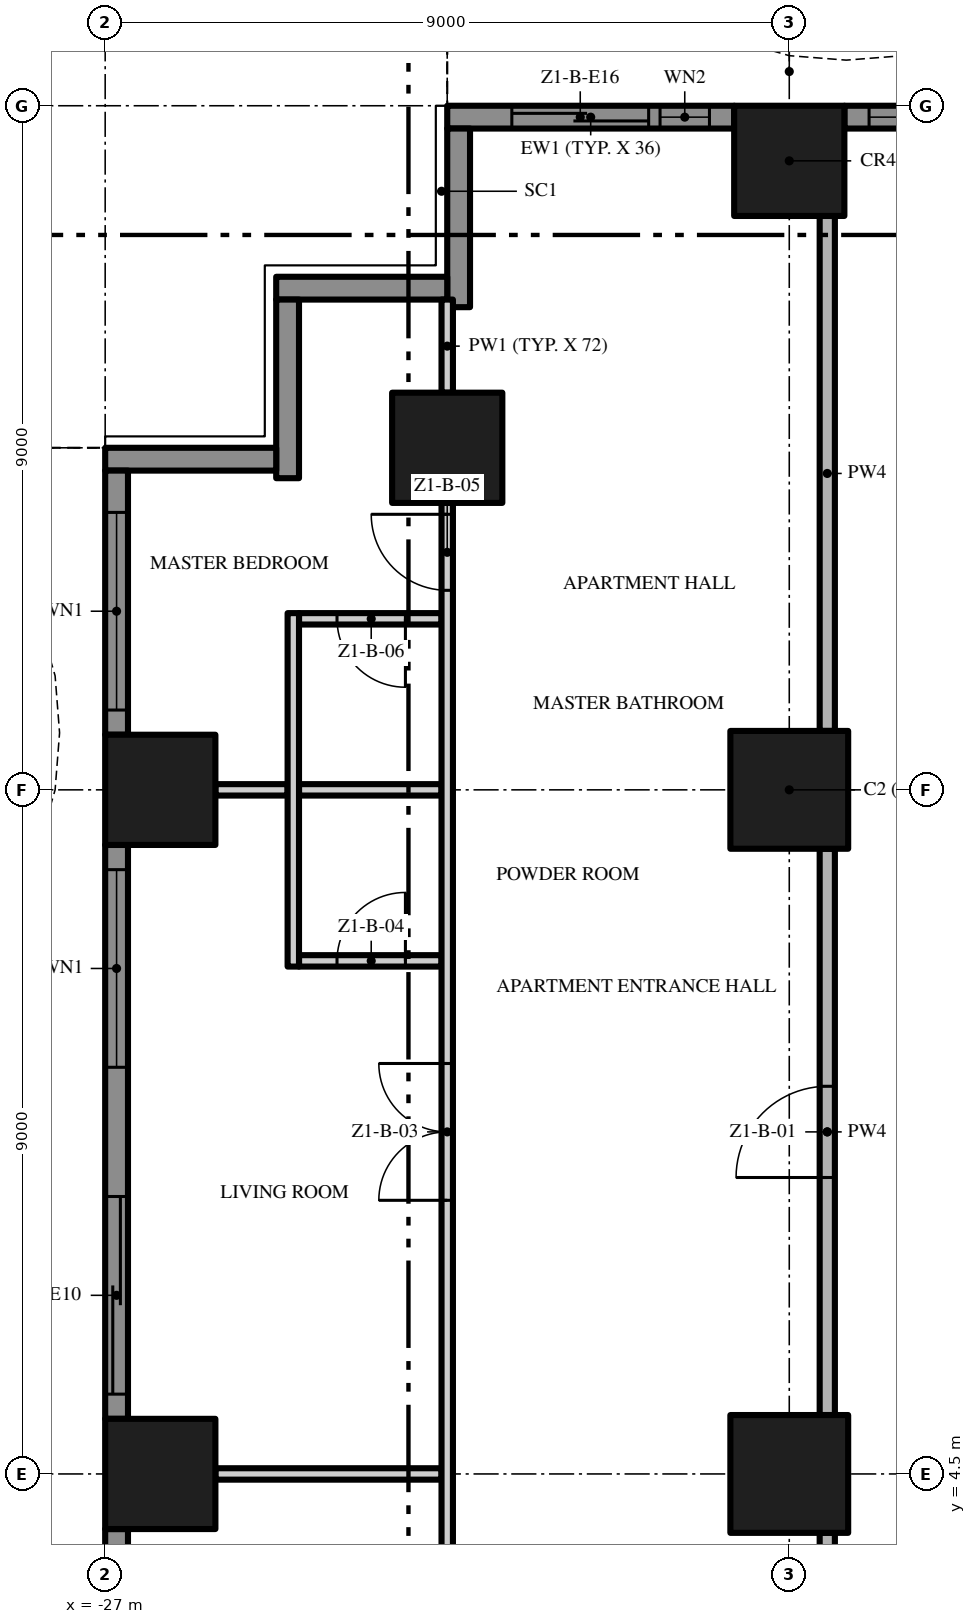
"""IFC4 building model, lengths in metres.
Left out: names, types, materials, properties, quantities, classifications, styles, units other than length and angle.
Written with IfcOpenShell. Run it as: python <this file> out.ifc"""

import sys

from ifc_helpers import new_model, si_unit, direction, frame, frame_2d, origin, origin_2d, place, context, subcontext, project, spatial, polyline, rectangle, outline, extrude, element, fill, save


model = new_model("IFC4")
c1 = context("Model", 3, precision=1e-05, world=origin(), true_north=direction((0.0, 1.0)))
c2 = subcontext(c1, "Body", "Model", "MODEL_VIEW")
j1 = project(units=[si_unit("LENGTHUNIT", "METRE"), si_unit("PLANEANGLEUNIT", "RADIAN")], contexts=[c1])
p1 = place(None, origin())
s1 = spatial("IfcSite", under=j1, at=p1, CompositionType="ELEMENT")
p2 = place(p1, origin())
s2 = spatial("IfcBuilding", under=s1, at=p2, CompositionType="ELEMENT")
p3 = place(p2, frame((0.0, 0.0, 30.2)))
s3 = spatial("IfcBuildingStorey", under=s2, at=p3, CompositionType="ELEMENT", Elevation=30.2)
p4 = place(p3, frame((-18.0, 13.5, 0.0), z_axis=(0.0, 0.0, 1.0), x_axis=(1.0, 0.0, 0.0)))
e1 = element("IfcColumn", 1, at=p4, inside=s3, PredefinedType="COLUMN", context=c2, shape_type="SweptSolid", body=[
    extrude(rectangle(XDim=1.55, YDim=1.55, at=origin_2d()), origin(), (0.0, 0.0, 1.0), 3.5),
])
p5 = place(p3, frame((-18.0, 21.775, 0.0), z_axis=(0.0, 0.0, 1.0), x_axis=(1.0, 0.0, 0.0)))
e2 = element("IfcColumn", 2, at=p5, inside=s3, PredefinedType="COLUMN", context=c2, shape_type="SweptSolid", body=[
    extrude(rectangle(XDim=1.45, YDim=1.45, at=origin_2d()), origin(), (0.0, 0.0, 1.0), 3.5),
])
p6 = place(p3, frame((-18.0, 4.5, 0.0), z_axis=(0.0, 0.0, 1.0), x_axis=(1.0, 0.0, 0.0)))
e3 = element("IfcColumn", 3, at=p6, inside=s3, PredefinedType="COLUMN", context=c2, shape_type="SweptSolid", body=[
    extrude(rectangle(XDim=1.55, YDim=1.55, at=origin_2d()), origin(), (0.0, 0.0, 1.0), 3.5),
])
for number, where, z_axis, x_axis in (
    (4, (-26.275, 13.5, 0.0), (0.0, 0.0, 1.0), (1.0, 0.0, 0.0)),
    (5, (-22.5, 18.0, 0.0), (0.0, 0.0, 1.0), (1.0, 0.0, 0.0)),
    (6, (-26.275, 4.5, 0.0), (0.0, 0.0, 1.0), (1.0, 0.0, 0.0)),
):
    element("IfcColumn", number, at=place(p3, frame(where, z_axis=z_axis, x_axis=x_axis)), inside=s3, PredefinedType="COLUMN", context=c2, shape_type="SweptSolid", body=[
        extrude(rectangle(XDim=1.45, YDim=1.45, at=origin_2d()), origin(), (0.0, 0.0, 1.0), 3.5),
    ])
p7 = place(p3, frame((-17.275, 22.35, 0.0), z_axis=(0.0, 0.0, 1.0), x_axis=(1.0, 0.0, 0.0)))
e7 = element("IfcWall", 7, at=p7, inside=s3, PredefinedType="SOLIDWALL", context=c2, shape_type="SweptSolid", body=[
    extrude(rectangle(XDim=3.775, YDim=0.3, at=frame_2d((1.887, 0.0))), origin(), (0.0, 0.0, 1.0), 3.5),
])
p8 = place(p7, frame((0.325, 0.0, 0.45)))
e8 = element("IfcOpeningElement", 8, at=p8, cuts=e7, PredefinedType="OPENING", context=c2, shape_type="SweptSolid", body=[
    extrude(rectangle(XDim=2.6, YDim=2.65, at=frame_2d((1.3, 1.325))), frame((0.0, 0.16, 0.0), z_axis=(0.0, -1.0, 0.0), x_axis=(1.0, 0.0, 0.0)), (0.0, 0.0, 1.0), 0.32),
])
p9 = place(p3, frame((-22.5, 22.35, 0.0), z_axis=(0.0, 0.0, 1.0), x_axis=(1.0, 0.0, 0.0)))
e9 = element("IfcWall", 9, at=p9, inside=s3, PredefinedType="SOLIDWALL", context=c2, shape_type="SweptSolid", body=[
    extrude(rectangle(XDim=3.775, YDim=0.3, at=frame_2d((1.887, 0.0))), origin(), (0.0, 0.0, 1.0), 3.5),
])
p10 = place(p9, frame((2.8, 0.0, 0.45)))
e10 = element("IfcOpeningElement", 10, at=p10, cuts=e9, PredefinedType="OPENING", context=c2, shape_type="SweptSolid", body=[
    extrude(rectangle(XDim=0.65, YDim=2.65, at=frame_2d((0.325, 1.325))), frame((0.0, 0.16, 0.0), z_axis=(0.0, -1.0, 0.0), x_axis=(1.0, 0.0, 0.0)), (0.0, 0.0, 1.0), 0.32),
])
p11 = place(p9, frame((0.85, 0.0, 0.0)))
e11 = element("IfcOpeningElement", 11, at=p11, cuts=e9, PredefinedType="OPENING", context=c2, shape_type="SweptSolid", body=[
    extrude(rectangle(XDim=1.8, YDim=2.4, at=frame_2d((0.9, 1.2))), frame((0.0, 0.16, 0.0), z_axis=(0.0, -1.0, 0.0), x_axis=(1.0, 0.0, 0.0)), (0.0, 0.0, 1.0), 0.32),
])
p12 = place(p3, frame((-22.35, 19.85, 0.0), z_axis=(0.0, 0.0, 1.0), x_axis=(0.0, 1.0, 0.0)))
e12 = element("IfcWall", 12, at=p12, inside=s3, PredefinedType="SOLIDWALL", context=c2, shape_type="SweptSolid", body=[
    extrude(rectangle(XDim=2.35, YDim=0.3, at=frame_2d((1.175, 0.0))), origin(), (0.0, 0.0, 1.0), 3.5),
])
p13 = place(p3, frame((-24.75, 20.1, 0.0), z_axis=(0.0, 0.0, 1.0), x_axis=(1.0, 0.0, 0.0)))
e13 = element("IfcWall", 13, at=p13, inside=s3, PredefinedType="SOLIDWALL", context=c2, shape_type="SweptSolid", body=[
    extrude(rectangle(XDim=2.25, YDim=0.3, at=frame_2d((1.125, 0.0))), origin(), (0.0, 0.0, 1.0), 3.5),
])
p14 = place(p3, frame((-24.6, 17.6, 0.0), z_axis=(0.0, 0.0, 1.0), x_axis=(0.0, 1.0, 0.0)))
e14 = element("IfcWall", 14, at=p14, inside=s3, PredefinedType="SOLIDWALL", context=c2, shape_type="SweptSolid", body=[
    extrude(rectangle(XDim=2.35, YDim=0.3, at=frame_2d((1.175, 0.0))), origin(), (0.0, 0.0, 1.0), 3.5),
])
p15 = place(p3, frame((-27.0, 17.85, 0.0), z_axis=(0.0, 0.0, 1.0), x_axis=(1.0, 0.0, 0.0)))
e15 = element("IfcWall", 15, at=p15, inside=s3, PredefinedType="SOLIDWALL", context=c2, shape_type="SweptSolid", body=[
    extrude(rectangle(XDim=2.25, YDim=0.3, at=frame_2d((1.125, 0.0))), origin(), (0.0, 0.0, 1.0), 3.5),
])
p16 = place(p3, frame((-26.85, 14.225, 0.0), z_axis=(0.0, 0.0, 1.0), x_axis=(0.0, 1.0, 0.0)))
e16 = element("IfcWall", 16, at=p16, inside=s3, PredefinedType="SOLIDWALL", context=c2, shape_type="SweptSolid", body=[
    extrude(rectangle(XDim=3.475, YDim=0.3, at=frame_2d((1.738, 0.0))), origin(), (0.0, 0.0, 1.0), 3.5),
])
p17 = place(p16, frame((0.325, 0.0, 0.45)))
e17 = element("IfcOpeningElement", 17, at=p17, cuts=e16, PredefinedType="OPENING", context=c2, shape_type="SweptSolid", body=[
    extrude(rectangle(XDim=2.6, YDim=2.65, at=frame_2d((1.3, 1.325))), frame((0.0, 0.16, 0.0), z_axis=(0.0, -1.0, 0.0), x_axis=(1.0, 0.0, 0.0)), (0.0, 0.0, 1.0), 0.32),
])
p18 = place(p3, frame((-26.85, 5.225, 0.0), z_axis=(0.0, 0.0, 1.0), x_axis=(0.0, 1.0, 0.0)))
e18 = element("IfcWall", 18, at=p18, inside=s3, PredefinedType="SOLIDWALL", context=c2, shape_type="SweptSolid", body=[
    extrude(rectangle(XDim=7.55, YDim=0.3, at=frame_2d((3.775, 0.0))), origin(), (0.0, 0.0, 1.0), 3.5),
])
p19 = place(p18, frame((4.625, 0.0, 0.45)))
e19 = element("IfcOpeningElement", 19, at=p19, cuts=e18, PredefinedType="OPENING", context=c2, shape_type="SweptSolid", body=[
    extrude(rectangle(XDim=2.6, YDim=2.65, at=frame_2d((1.3, 1.325))), frame((0.0, 0.16, 0.0), z_axis=(0.0, -1.0, 0.0), x_axis=(1.0, 0.0, 0.0)), (0.0, 0.0, 1.0), 0.32),
])
p20 = place(p18, frame((0.325, 0.0, 0.0)))
e20 = element("IfcOpeningElement", 20, at=p20, cuts=e18, PredefinedType="OPENING", context=c2, shape_type="SweptSolid", body=[
    extrude(rectangle(XDim=2.6, YDim=2.4, at=frame_2d((1.3, 1.2))), frame((0.0, 0.16, 0.0), z_axis=(0.0, -1.0, 0.0), x_axis=(1.0, 0.0, 0.0)), (0.0, 0.0, 1.0), 0.32),
])
p21 = place(p3, frame((-26.85, -3.775, 0.0), z_axis=(0.0, 0.0, 1.0), x_axis=(0.0, 1.0, 0.0)))
e21 = element("IfcWall", 21, at=p21, inside=s3, PredefinedType="SOLIDWALL", context=c2, shape_type="SweptSolid", body=[
    extrude(rectangle(XDim=7.55, YDim=0.3, at=frame_2d((3.775, 0.0))), origin(), (0.0, 0.0, 1.0), 3.5),
])
p22 = place(p21, frame((4.625, 0.0, 0.45)))
e22 = element("IfcOpeningElement", 22, at=p22, cuts=e21, PredefinedType="OPENING", context=c2, shape_type="SweptSolid", body=[
    extrude(rectangle(XDim=2.6, YDim=2.65, at=frame_2d((1.3, 1.325))), frame((0.0, 0.16, 0.0), z_axis=(0.0, -1.0, 0.0), x_axis=(1.0, 0.0, 0.0)), (0.0, 0.0, 1.0), 0.32),
])
p23 = place(p21, frame((0.325, 0.0, 0.45)))
e23 = element("IfcOpeningElement", 23, at=p23, cuts=e21, PredefinedType="OPENING", context=c2, shape_type="SweptSolid", body=[
    extrude(rectangle(XDim=2.6, YDim=2.65, at=frame_2d((1.3, 1.325))), frame((0.0, 0.16, 0.0), z_axis=(0.0, -1.0, 0.0), x_axis=(1.0, 0.0, 0.0)), (0.0, 0.0, 1.0), 0.32),
])
p24 = place(p3, origin())
e24 = element("IfcWall", 24, at=p24, inside=s3, PredefinedType="USERDEFINED", context=c2, shape_type="SweptSolid", body=[
    extrude(outline(polyline([(-13.5, 24.3), (-15.0, 23.595), (-16.5, 23.159), (-17.25, 23.1), (-18.0, 23.159), (-19.5, 23.595), (-21.0, 24.3), (-22.5, 25.005), (-22.606, 24.779), (-21.106, 24.074), (-19.589, 23.36), (-18.045, 22.911), (-17.25, 22.849), (-16.455, 22.911), (-14.911, 23.36), (-13.394, 24.074), (-13.5, 24.3)])), origin(), (0.0, 0.0, 1.0), 0.9),
])
p25 = place(p3, origin())
e25 = element("IfcWall", 25, at=p25, inside=s3, PredefinedType="USERDEFINED", context=c2, shape_type="SweptSolid", body=[
    extrude(outline(polyline([(-28.8, 18.0), (-28.095, 16.5), (-27.659, 15.0), (-27.6, 14.25), (-27.659, 13.5), (-28.095, 12.0), (-28.8, 10.5), (-29.505, 9.0), (-29.941, 7.5), (-30.0, 6.75), (-29.941, 6.0), (-29.505, 4.5), (-28.8, 3.0), (-28.095, 1.5), (-27.659, 0.0), (-27.6, -0.75), (-27.659, -1.5), (-28.095, -3.0), (-28.8, -4.5), (-29.505, -6.0), (-29.941, -7.5), (-30.0, -8.25), (-29.941, -9.0), (-29.505, -10.5), (-28.8, -12.0), (-28.095, -13.5), (-27.659, -15.0), (-27.6, -15.75), (-27.659, -16.5), (-28.095, -18.0), (-27.855, -18.07), (-27.411, -16.545), (-27.349, -15.75), (-27.411, -14.955), (-27.86, -13.411), (-28.574, -11.894), (-29.271, -10.411), (-29.694, -8.955), (-29.749, -8.25), (-29.694, -7.545), (-29.271, -6.089), (-28.574, -4.606), (-27.86, -3.089), (-27.411, -1.545), (-27.349, -0.75), (-27.411, 0.045), (-27.86, 1.589), (-28.574, 3.106), (-29.271, 4.589), (-29.694, 6.045), (-29.749, 6.75), (-29.694, 7.455), (-29.271, 8.911), (-28.574, 10.394), (-27.86, 11.911), (-27.411, 13.455), (-27.349, 14.25), (-27.411, 15.045), (-27.86, 16.589), (-28.574, 18.106), (-28.8, 18.0)])), origin(), (0.0, 0.0, 1.0), 0.9),
])
p26 = place(p3, frame((-25.55, 4.5, 0.0), z_axis=(0.0, 0.0, 1.0), x_axis=(1.0, 0.0, 0.0)))
e26 = element("IfcWall", 26, at=p26, inside=s3, PredefinedType="PARTITIONING", context=c2, shape_type="SweptSolid", body=[
    extrude(rectangle(XDim=2.975, YDim=0.15, at=frame_2d((1.488, 0.0))), origin(), (0.0, 0.0, 1.0), 3.5),
])
p27 = place(p3, frame((-24.45, 11.25, 0.0), z_axis=(0.0, 0.0, 1.0), x_axis=(1.0, 0.0, 0.0)))
e27 = element("IfcWall", 27, at=p27, inside=s3, PredefinedType="PARTITIONING", context=c2, shape_type="SweptSolid", body=[
    extrude(rectangle(XDim=1.875, YDim=0.15, at=frame_2d((0.938, 0.0))), origin(), (0.0, 0.0, 1.0), 3.5),
])
p28 = place(p27, frame((0.5, 0.0, 0.0)))
e28 = element("IfcOpeningElement", 28, at=p28, cuts=e27, PredefinedType="OPENING", context=c2, shape_type="SweptSolid", body=[
    extrude(rectangle(XDim=0.9, YDim=2.1, at=frame_2d((0.45, 1.05))), frame((0.0, 0.085, 0.0), z_axis=(0.0, -1.0, 0.0), x_axis=(1.0, 0.0, 0.0)), (0.0, 0.0, 1.0), 0.17),
])
p29 = place(p3, frame((-25.55, 13.5, 0.0), z_axis=(0.0, 0.0, 1.0), x_axis=(1.0, 0.0, 0.0)))
e29 = element("IfcWall", 29, at=p29, inside=s3, PredefinedType="PARTITIONING", context=c2, shape_type="SweptSolid", body=[
    extrude(rectangle(XDim=0.95, YDim=0.15, at=frame_2d((0.475, 0.0))), origin(), (0.0, 0.0, 1.0), 3.5),
])
p30 = place(p3, frame((-24.45, 13.5, 0.0), z_axis=(0.0, 0.0, 1.0), x_axis=(1.0, 0.0, 0.0)))
e30 = element("IfcWall", 30, at=p30, inside=s3, PredefinedType="PARTITIONING", context=c2, shape_type="SweptSolid", body=[
    extrude(rectangle(XDim=1.875, YDim=0.15, at=frame_2d((0.938, 0.0))), origin(), (0.0, 0.0, 1.0), 3.5),
])
p31 = place(p3, frame((-22.575, 15.75, 0.0), z_axis=(0.0, 0.0, 1.0), x_axis=(-1.0, 0.0, 0.0)))
e31 = element("IfcWall", 31, at=p31, inside=s3, PredefinedType="PARTITIONING", context=c2, shape_type="SweptSolid", body=[
    extrude(rectangle(XDim=1.875, YDim=0.15, at=frame_2d((0.938, 0.0))), origin(), (0.0, 0.0, 1.0), 3.5),
])
p32 = place(p31, frame((0.475, 0.0, 0.0)))
e32 = element("IfcOpeningElement", 32, at=p32, cuts=e31, PredefinedType="OPENING", context=c2, shape_type="SweptSolid", body=[
    extrude(rectangle(XDim=0.9, YDim=2.1, at=frame_2d((0.45, 1.05))), frame((0.0, 0.085, 0.0), z_axis=(0.0, -1.0, 0.0), x_axis=(1.0, 0.0, 0.0)), (0.0, 0.0, 1.0), 0.17),
])
p33 = place(p3, frame((-24.525, 11.175, 0.0), z_axis=(0.0, 0.0, 1.0), x_axis=(0.0, 1.0, 0.0)))
e33 = element("IfcWall", 33, at=p33, inside=s3, PredefinedType="PARTITIONING", context=c2, shape_type="SweptSolid", body=[
    extrude(rectangle(XDim=4.65, YDim=0.15, at=frame_2d((2.325, 0.0))), origin(), (0.0, 0.0, 1.0), 3.5),
])
p34 = place(p3, frame((-22.5, 0.1, 0.0), z_axis=(0.0, 0.0, 1.0), x_axis=(0.0, 1.0, 0.0)))
e34 = element("IfcWall", 34, at=p34, inside=s3, PredefinedType="PARTITIONING", context=c2, shape_type="SweptSolid", body=[
    extrude(rectangle(XDim=17.175, YDim=0.15, at=frame_2d((8.588, 0.0))), origin(), (0.0, 0.0, 1.0), 3.5),
])
p35 = place(p34, frame((1.65, 0.0, 0.0)))
e35 = element("IfcOpeningElement", 35, at=p35, cuts=e34, PredefinedType="OPENING", context=c2, shape_type="SweptSolid", body=[
    extrude(rectangle(XDim=1.0, YDim=2.4, at=frame_2d((0.5, 1.2))), frame((0.0, 0.085, 0.0), z_axis=(0.0, -1.0, 0.0), x_axis=(1.0, 0.0, 0.0)), (0.0, 0.0, 1.0), 0.17),
])
p36 = place(p34, frame((8.0, 0.0, 0.0)))
e36 = element("IfcOpeningElement", 36, at=p36, cuts=e34, PredefinedType="OPENING", context=c2, shape_type="SweptSolid", body=[
    extrude(rectangle(XDim=1.8, YDim=2.4, at=frame_2d((0.9, 1.2))), frame((0.0, 0.085, 0.0), z_axis=(0.0, -1.0, 0.0), x_axis=(1.0, 0.0, 0.0)), (0.0, 0.0, 1.0), 0.17),
])
p37 = place(p34, frame((16.025, 0.0, 0.0)))
e37 = element("IfcOpeningElement", 37, at=p37, cuts=e34, PredefinedType="OPENING", context=c2, shape_type="SweptSolid", body=[
    extrude(rectangle(XDim=1.0, YDim=2.4, at=frame_2d((0.5, 1.2))), frame((0.0, 0.085, 0.0), z_axis=(0.0, -1.0, 0.0), x_axis=(1.0, 0.0, 0.0)), (0.0, 0.0, 1.0), 0.17),
])
p38 = place(p3, frame((-22.5, 18.725, 0.0), z_axis=(0.0, 0.0, 1.0), x_axis=(0.0, 1.0, 0.0)))
e38 = element("IfcWall", 38, at=p38, inside=s3, PredefinedType="PARTITIONING", context=c2, shape_type="SweptSolid", body=[
    extrude(rectangle(XDim=1.225, YDim=0.15, at=frame_2d((0.613, 0.0))), origin(), (0.0, 0.0, 1.0), 3.5),
])
p39 = place(p3, frame((-17.5, -0.2, 0.0), z_axis=(0.0, 0.0, 1.0), x_axis=(0.0, 1.0, 0.0)))
e39 = element("IfcWall", 39, at=p39, inside=s3, PredefinedType="PARTITIONING", context=c2, shape_type="SweptSolid", body=[
    extrude(rectangle(XDim=3.925, YDim=0.2, at=frame_2d((1.962, 0.0))), origin(), (0.0, 0.0, 1.0), 3.5),
])
p40 = place(p3, frame((-17.5, 5.275, 0.0), z_axis=(0.0, 0.0, 1.0), x_axis=(0.0, 1.0, 0.0)))
e40 = element("IfcWall", 40, at=p40, inside=s3, PredefinedType="PARTITIONING", context=c2, shape_type="SweptSolid", body=[
    extrude(rectangle(XDim=7.45, YDim=0.2, at=frame_2d((3.725, 0.0))), origin(), (0.0, 0.0, 1.0), 3.5),
])
p41 = place(p40, frame((3.125, 0.0, 0.0)))
e41 = element("IfcOpeningElement", 41, at=p41, cuts=e40, PredefinedType="OPENING", context=c2, shape_type="SweptSolid", body=[
    extrude(rectangle(XDim=1.2, YDim=2.4, at=frame_2d((0.6, 1.2))), frame((0.0, 0.11, 0.0), z_axis=(0.0, -1.0, 0.0), x_axis=(1.0, 0.0, 0.0)), (0.0, 0.0, 1.0), 0.22),
])
p42 = place(p3, frame((-17.5, 14.275, 0.0), z_axis=(0.0, 0.0, 1.0), x_axis=(0.0, 1.0, 0.0)))
e42 = element("IfcWall", 42, at=p42, inside=s3, PredefinedType="PARTITIONING", context=c2, shape_type="SweptSolid", body=[
    extrude(rectangle(XDim=6.775, YDim=0.2, at=frame_2d((3.388, 0.0))), origin(), (0.0, 0.0, 1.0), 3.5),
])
p43 = place(p8, origin())
e43 = element("IfcWindow", 43, at=p43, inside=s3, PartitioningType="SINGLE_PANEL", PredefinedType="WINDOW", context=c2, shape_type="SweptSolid", body=[
    extrude(rectangle(XDim=2.6, YDim=2.65, at=frame_2d((1.3, 1.325))), frame((0.0, 0.03, 0.0), z_axis=(0.0, -1.0, 0.0), x_axis=(1.0, 0.0, 0.0)), (0.0, 0.0, 1.0), 0.06),
])
fill(e8, e43)
p44 = place(p10, origin())
e44 = element("IfcWindow", 44, at=p44, inside=s3, PartitioningType="SINGLE_PANEL", PredefinedType="WINDOW", context=c2, shape_type="SweptSolid", body=[
    extrude(rectangle(XDim=0.65, YDim=2.65, at=frame_2d((0.325, 1.325))), frame((0.0, 0.03, 0.0), z_axis=(0.0, -1.0, 0.0), x_axis=(1.0, 0.0, 0.0)), (0.0, 0.0, 1.0), 0.06),
])
fill(e10, e44)
p45 = place(p11, origin())
e45 = element("IfcDoor", 45, at=p45, inside=s3, OperationType="SINGLE_SWING_LEFT", PredefinedType="DOOR", context=c2, shape_type="SweptSolid", body=[
    extrude(rectangle(XDim=1.8, YDim=2.4, at=frame_2d((0.9, 1.2))), frame((0.0, 0.025, 0.0), z_axis=(0.0, -1.0, 0.0), x_axis=(1.0, 0.0, 0.0)), (0.0, 0.0, 1.0), 0.05),
])
fill(e11, e45)
p46 = place(p17, origin())
e46 = element("IfcWindow", 46, at=p46, inside=s3, PartitioningType="SINGLE_PANEL", PredefinedType="WINDOW", context=c2, shape_type="SweptSolid", body=[
    extrude(rectangle(XDim=2.6, YDim=2.65, at=frame_2d((1.3, 1.325))), frame((0.0, 0.03, 0.0), z_axis=(0.0, -1.0, 0.0), x_axis=(1.0, 0.0, 0.0)), (0.0, 0.0, 1.0), 0.06),
])
fill(e17, e46)
p47 = place(p19, origin())
e47 = element("IfcWindow", 47, at=p47, inside=s3, PartitioningType="SINGLE_PANEL", PredefinedType="WINDOW", context=c2, shape_type="SweptSolid", body=[
    extrude(rectangle(XDim=2.6, YDim=2.65, at=frame_2d((1.3, 1.325))), frame((0.0, 0.03, 0.0), z_axis=(0.0, -1.0, 0.0), x_axis=(1.0, 0.0, 0.0)), (0.0, 0.0, 1.0), 0.06),
])
fill(e19, e47)
p48 = place(p20, origin())
e48 = element("IfcDoor", 48, at=p48, inside=s3, OperationType="SINGLE_SWING_LEFT", PredefinedType="DOOR", context=c2, shape_type="SweptSolid", body=[
    extrude(rectangle(XDim=2.6, YDim=2.4, at=frame_2d((1.3, 1.2))), frame((0.0, 0.025, 0.0), z_axis=(0.0, -1.0, 0.0), x_axis=(1.0, 0.0, 0.0)), (0.0, 0.0, 1.0), 0.05),
])
fill(e20, e48)
p49 = place(p41, origin())
e49 = element("IfcDoor", 49, at=p49, inside=s3, OperationType="SINGLE_SWING_LEFT", PredefinedType="DOOR", context=c2, shape_type="SweptSolid", body=[
    extrude(rectangle(XDim=1.2, YDim=2.4, at=frame_2d((0.6, 1.2))), frame((0.0, 0.025, 0.0), z_axis=(0.0, -1.0, 0.0), x_axis=(1.0, 0.0, 0.0)), (0.0, 0.0, 1.0), 0.05),
])
fill(e41, e49)
p50 = place(p36, origin())
e50 = element("IfcDoor", 50, at=p50, inside=s3, OperationType="DOUBLE_DOOR_SINGLE_SWING", PredefinedType="DOOR", context=c2, shape_type="SweptSolid", body=[
    extrude(rectangle(XDim=1.8, YDim=2.4, at=frame_2d((0.9, 1.2))), frame((0.0, 0.025, 0.0), z_axis=(0.0, -1.0, 0.0), x_axis=(1.0, 0.0, 0.0)), (0.0, 0.0, 1.0), 0.05),
])
fill(e36, e50)
p51 = place(p28, origin())
e51 = element("IfcDoor", 51, at=p51, inside=s3, OperationType="SINGLE_SWING_RIGHT", PredefinedType="DOOR", context=c2, shape_type="SweptSolid", body=[
    extrude(rectangle(XDim=0.9, YDim=2.1, at=frame_2d((0.45, 1.05))), frame((0.0, 0.025, 0.0), z_axis=(0.0, -1.0, 0.0), x_axis=(1.0, 0.0, 0.0)), (0.0, 0.0, 1.0), 0.05),
])
fill(e28, e51)
p52 = place(p37, origin())
e52 = element("IfcDoor", 52, at=p52, inside=s3, OperationType="SINGLE_SWING_RIGHT", PredefinedType="DOOR", context=c2, shape_type="SweptSolid", body=[
    extrude(rectangle(XDim=1.0, YDim=2.4, at=frame_2d((0.5, 1.2))), frame((0.0, 0.025, 0.0), z_axis=(0.0, -1.0, 0.0), x_axis=(1.0, 0.0, 0.0)), (0.0, 0.0, 1.0), 0.05),
])
fill(e37, e52)
p53 = place(p32, origin())
e53 = element("IfcDoor", 53, at=p53, inside=s3, OperationType="SINGLE_SWING_LEFT", PredefinedType="DOOR", context=c2, shape_type="SweptSolid", body=[
    extrude(rectangle(XDim=0.9, YDim=2.1, at=frame_2d((0.45, 1.05))), frame((0.0, 0.025, 0.0), z_axis=(0.0, -1.0, 0.0), x_axis=(1.0, 0.0, 0.0)), (0.0, 0.0, 1.0), 0.05),
])
fill(e32, e53)
save(model, sys.argv[1])
